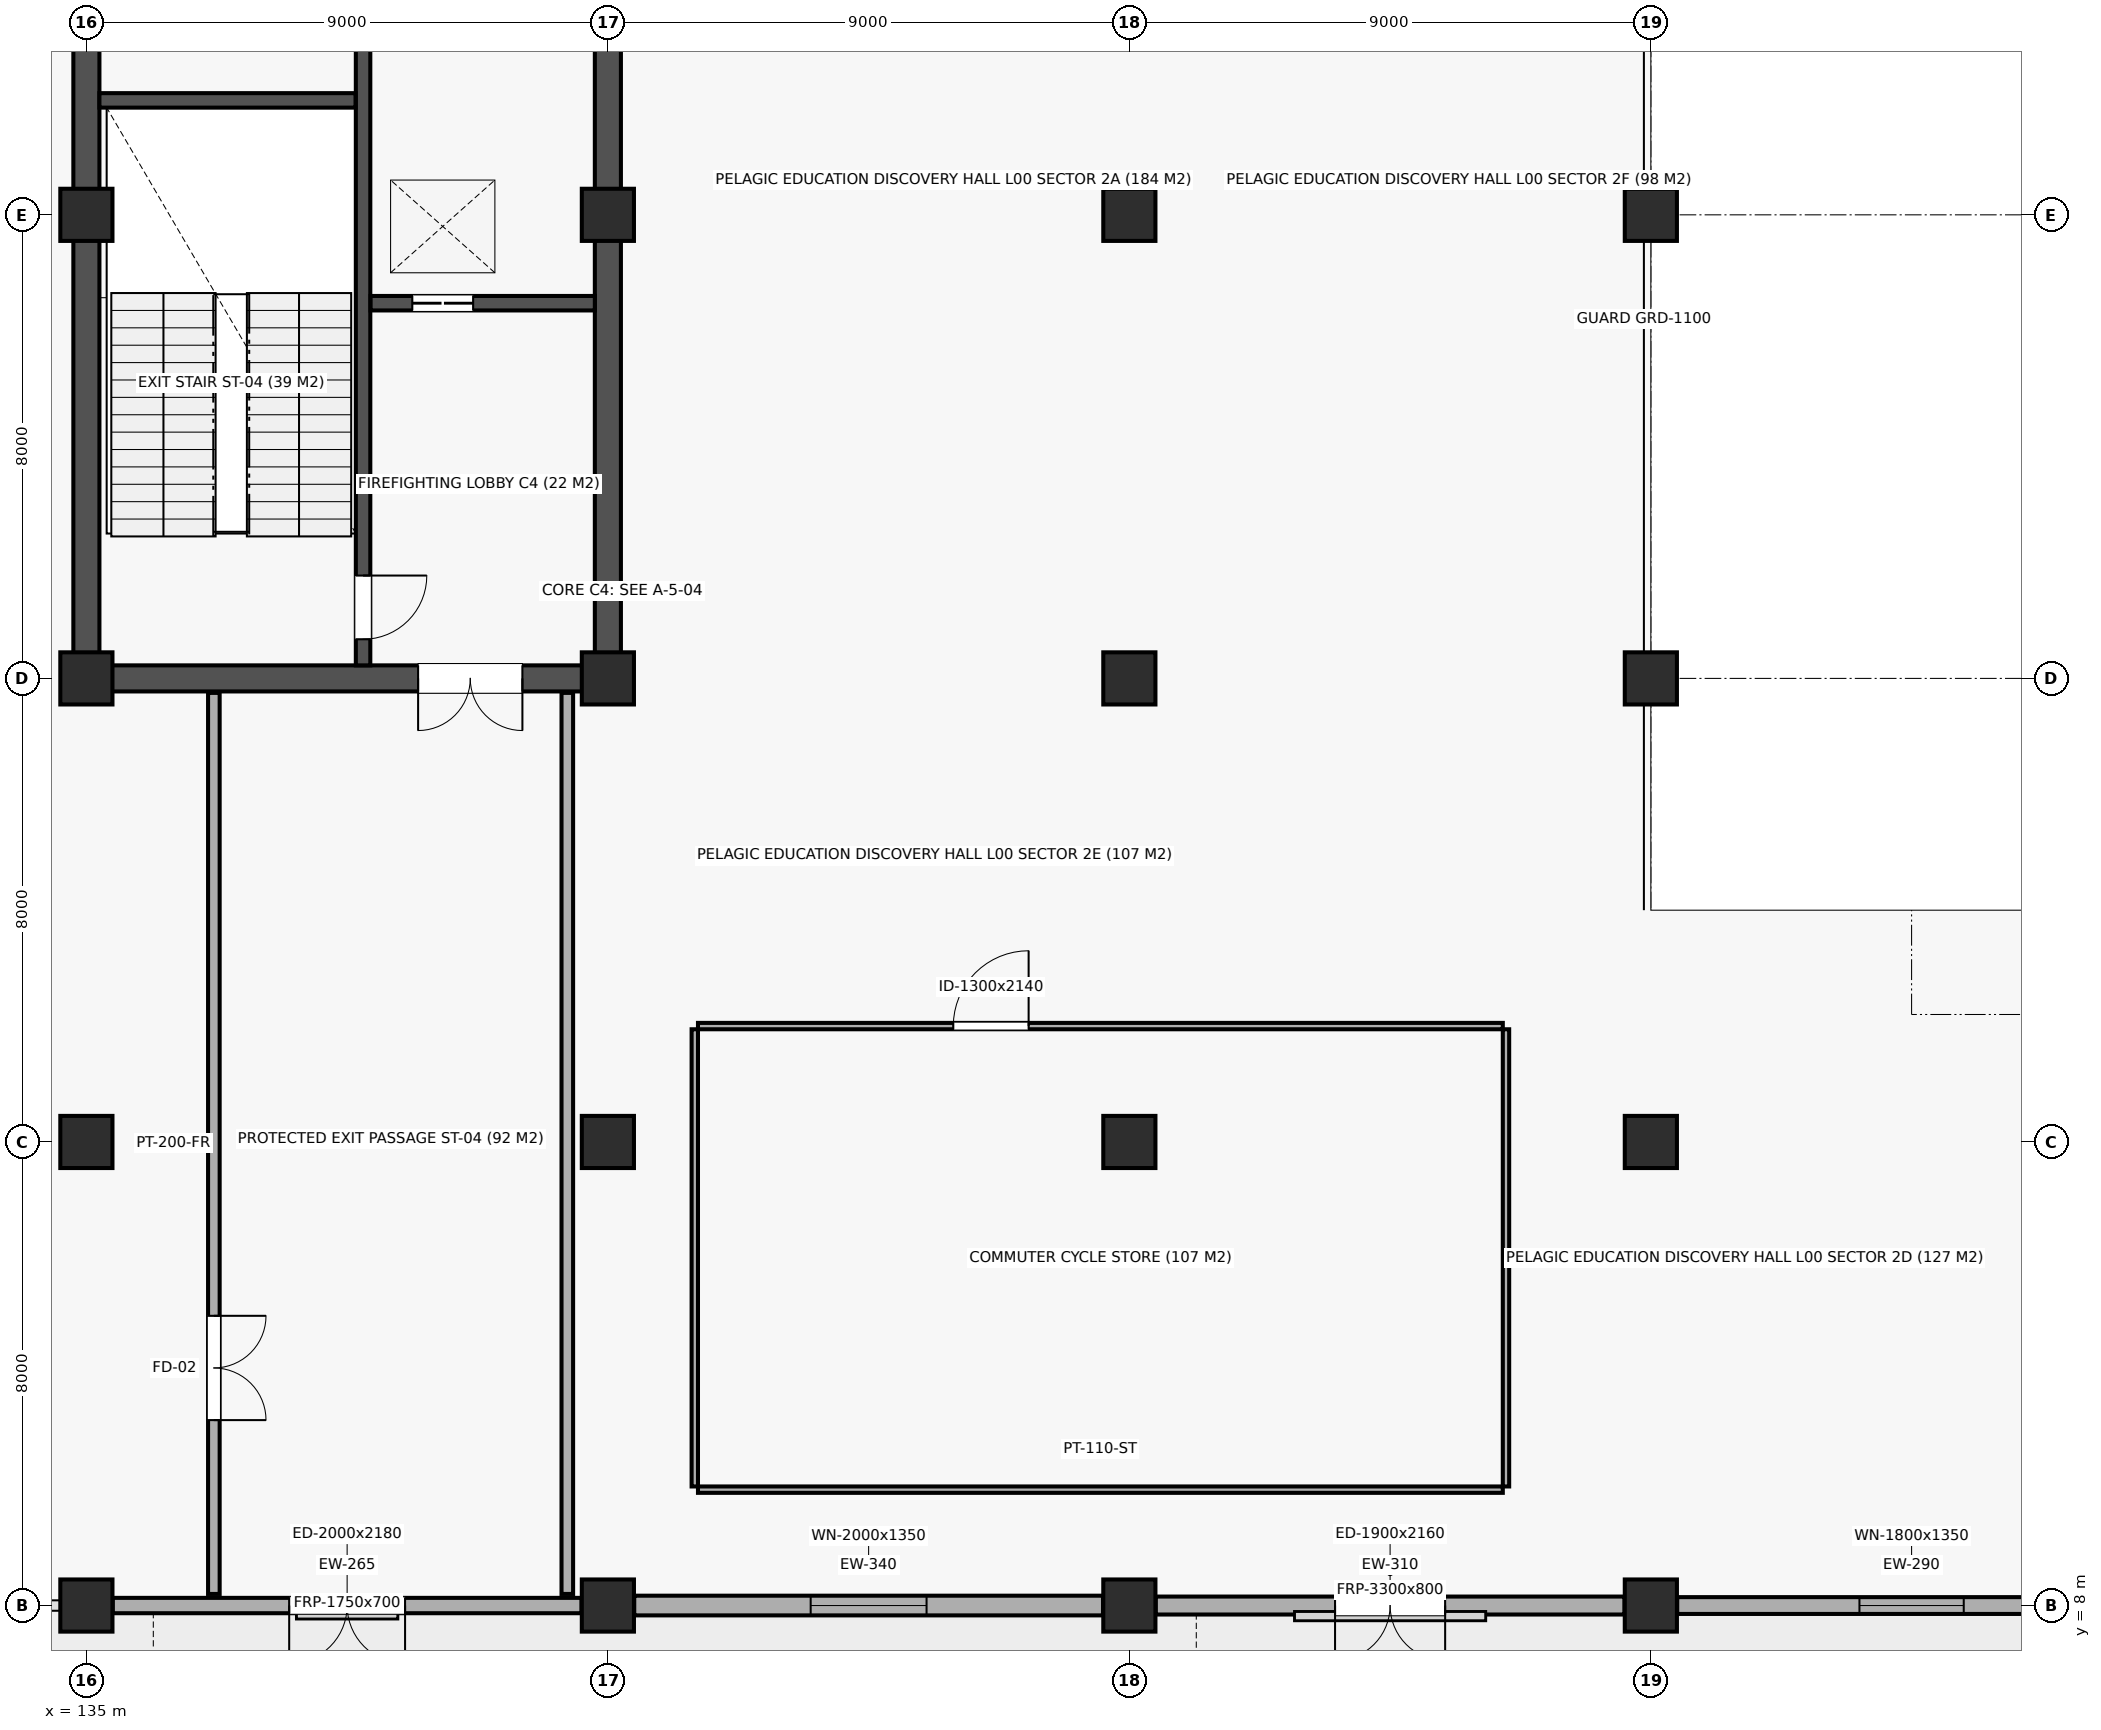
"""IFC4 building model, lengths in metres.
Left out: names, types, materials, properties, quantities, classifications, styles, units other than length and angle.
Written with IfcOpenShell. Run it as: python <this file> out.ifc"""

import sys

from ifc_helpers import new_model, si_unit, direction, frame, frame_2d, origin, origin_2d, place, context, subcontext, project, spatial, rectangle, extrude, element, fill, save


model = new_model("IFC4")
c1 = context("Model", 3, precision=1e-05, world=origin(), true_north=direction((0.0, 1.0)))
c2 = subcontext(c1, "Body", "Model", "MODEL_VIEW")
j1 = project(units=[si_unit("LENGTHUNIT", "METRE"), si_unit("PLANEANGLEUNIT", "RADIAN")], contexts=[c1])
p1 = place(None, origin())
s1 = spatial("IfcSite", under=j1, at=p1, CompositionType="ELEMENT")
p2 = place(p1, origin())
s2 = spatial("IfcBuilding", under=s1, at=p2, CompositionType="ELEMENT")
p3 = place(p2, origin())
s3 = spatial("IfcBuildingStorey", under=s2, at=p3, CompositionType="ELEMENT", Elevation=0.0)
for number, where, z_axis, x_axis in (
    (1, (135.0, 8.0, 0.0), (0.0, 0.0, 1.0), (1.0, 0.0, 0.0)),
    (2, (135.0, 16.0, 0.0), (0.0, 0.0, 1.0), (1.0, 0.0, 0.0)),
    (3, (135.0, 24.0, 0.0), (0.0, 0.0, 1.0), (1.0, 0.0, 0.0)),
    (4, (135.0, 32.0, 0.0), (0.0, 0.0, 1.0), (1.0, 0.0, 0.0)),
    (5, (144.0, 8.0, 0.0), (0.0, 0.0, 1.0), (1.0, 0.0, 0.0)),
    (6, (144.0, 16.0, 0.0), (0.0, 0.0, 1.0), (1.0, 0.0, 0.0)),
    (7, (144.0, 24.0, 0.0), (0.0, 0.0, 1.0), (1.0, 0.0, 0.0)),
    (8, (144.0, 32.0, 0.0), (0.0, 0.0, 1.0), (1.0, 0.0, 0.0)),
    (9, (153.0, 8.0, 0.0), (0.0, 0.0, 1.0), (1.0, 0.0, 0.0)),
    (10, (153.0, 16.0, 0.0), (0.0, 0.0, 1.0), (1.0, 0.0, 0.0)),
    (11, (153.0, 24.0, 0.0), (0.0, 0.0, 1.0), (1.0, 0.0, 0.0)),
    (12, (153.0, 32.0, 0.0), (0.0, 0.0, 1.0), (1.0, 0.0, 0.0)),
    (13, (162.0, 8.0, 0.0), (0.0, 0.0, 1.0), (1.0, 0.0, 0.0)),
    (14, (162.0, 16.0, 0.0), (0.0, 0.0, 1.0), (1.0, 0.0, 0.0)),
    (15, (162.0, 24.0, 0.0), (0.0, 0.0, 1.0), (1.0, 0.0, 0.0)),
    (16, (162.0, 32.0, 0.0), (0.0, 0.0, 1.0), (1.0, 0.0, 0.0)),
):
    element("IfcColumn", number, at=place(p3, frame(where, z_axis=z_axis, x_axis=x_axis)), inside=s3, PredefinedType="COLUMN", context=c2, shape_type="SweptSolid", body=[
        extrude(rectangle(XDim=0.9, YDim=0.9, at=origin_2d()), origin(), (0.0, 0.0, 1.0), 4.5),
    ])
p4 = place(p3, frame((135.225, 24.0, 0.0), z_axis=(0.0, 0.0, 1.0), x_axis=(1.0, 0.0, 0.0)))
e17 = element("IfcWall", 17, at=p4, inside=s3, PredefinedType="SHEAR", context=c2, shape_type="SweptSolid", body=[
    extrude(rectangle(XDim=8.55, YDim=0.45, at=frame_2d((4.275, 0.0))), origin(), (0.0, 0.0, 1.0), 3.45),
])
p5 = place(p4, frame((5.5, 0.0, 0.0)))
e18 = element("IfcOpeningElement", 18, at=p5, cuts=e17, PredefinedType="OPENING", context=c2, shape_type="SweptSolid", body=[
    extrude(rectangle(XDim=1.8, YDim=2.18, at=frame_2d((0.9, 1.09))), frame((0.0, 0.237, 0.0), z_axis=(0.0, -1.0, 0.0), x_axis=(1.0, 0.0, 0.0)), (0.0, 0.0, 1.0), 0.474),
])
p6 = place(p3, frame((135.0, 24.225, 0.0), z_axis=(0.0, 0.0, 1.0), x_axis=(0.0, 1.0, 0.0)))
e19 = element("IfcWall", 19, at=p6, inside=s3, PredefinedType="SHEAR", context=c2, shape_type="SweptSolid", body=[
    extrude(rectangle(XDim=15.55, YDim=0.45, at=frame_2d((7.775, 0.0))), origin(), (0.0, 0.0, 1.0), 3.45),
])
p7 = place(p6, frame((11.2, 0.0, 0.0)))
e20 = element("IfcOpeningElement", 20, at=p7, cuts=e19, PredefinedType="OPENING", context=c2, shape_type="SweptSolid", body=[
    extrude(rectangle(XDim=0.95, YDim=2.1, at=frame_2d((0.475, 1.05))), frame((0.0, 0.237, 0.0), z_axis=(0.0, -1.0, 0.0), x_axis=(1.0, 0.0, 0.0)), (0.0, 0.0, 1.0), 0.474),
])
p8 = place(p3, frame((144.0, 24.225, 0.0), z_axis=(0.0, 0.0, 1.0), x_axis=(0.0, 1.0, 0.0)))
e21 = element("IfcWall", 21, at=p8, inside=s3, PredefinedType="SHEAR", context=c2, shape_type="SweptSolid", body=[
    extrude(rectangle(XDim=15.55, YDim=0.45, at=frame_2d((7.775, 0.0))), origin(), (0.0, 0.0, 1.0), 3.45),
])
p9 = place(p3, frame((139.775, 24.225, 0.0), z_axis=(0.0, 0.0, 1.0), x_axis=(0.0, 1.0, 0.0)))
e22 = element("IfcWall", 22, at=p9, inside=s3, PredefinedType="SOLIDWALL", context=c2, shape_type="SweptSolid", body=[
    extrude(rectangle(XDim=15.55, YDim=0.25, at=frame_2d((7.775, 0.0))), origin(), (0.0, 0.0, 1.0), 3.45),
])
p10 = place(p9, frame((0.45, 0.0, 0.0)))
e23 = element("IfcOpeningElement", 23, at=p10, cuts=e22, PredefinedType="OPENING", context=c2, shape_type="SweptSolid", body=[
    extrude(rectangle(XDim=1.1, YDim=2.15, at=frame_2d((0.55, 1.075))), frame((0.0, 0.137, 0.0), z_axis=(0.0, -1.0, 0.0), x_axis=(1.0, 0.0, 0.0)), (0.0, 0.0, 1.0), 0.274),
])
p11 = place(p3, frame((135.225, 33.975, 0.0), z_axis=(0.0, 0.0, 1.0), x_axis=(1.0, 0.0, 0.0)))
e24 = element("IfcWall", 24, at=p11, inside=s3, PredefinedType="SOLIDWALL", context=c2, shape_type="SweptSolid", body=[
    extrude(rectangle(XDim=4.42, YDim=0.25, at=frame_2d((2.21, 0.0))), origin(), (0.0, 0.0, 1.0), 3.45),
])
p12 = place(p3, frame((139.905, 30.475, 0.0), z_axis=(0.0, 0.0, 1.0), x_axis=(1.0, 0.0, 0.0)))
e25 = element("IfcWall", 25, at=p12, inside=s3, PredefinedType="SOLIDWALL", context=c2, shape_type="SweptSolid", body=[
    extrude(rectangle(XDim=3.87, YDim=0.25, at=frame_2d((1.935, 0.0))), origin(), (0.0, 0.0, 1.0), 3.45),
])
p13 = place(p12, frame((0.72, 0.0, 0.0)))
e26 = element("IfcOpeningElement", 26, at=p13, cuts=e25, PredefinedType="OPENING", context=c2, shape_type="SweptSolid", body=[
    extrude(rectangle(XDim=1.05, YDim=2.12, at=frame_2d((0.525, 1.06))), frame((0.0, 0.137, 0.0), z_axis=(0.0, -1.0, 0.0), x_axis=(1.0, 0.0, 0.0)), (0.0, 0.0, 1.0), 0.274),
])
p14 = place(p3, frame((135.455, 8.0, 0.0), z_axis=(0.0, 0.0, 1.0), x_axis=(1.0, 0.0, 0.0)))
e27 = element("IfcWall", 27, at=p14, inside=s3, PredefinedType="STANDARD", context=c2, shape_type="SweptSolid", body=[
    extrude(rectangle(XDim=8.09, YDim=0.265, at=frame_2d((4.045, 0.0))), origin(), (0.0, 0.0, 1.0), 2.49),
])
p15 = place(p14, frame((3.045, 0.0, 0.0)))
e28 = element("IfcOpeningElement", 28, at=p15, cuts=e27, PredefinedType="OPENING", context=c2, shape_type="SweptSolid", body=[
    extrude(rectangle(XDim=2.0, YDim=2.18, at=frame_2d((1.0, 1.09))), frame((0.0, 0.145, 0.0), z_axis=(0.0, -1.0, 0.0), x_axis=(1.0, 0.0, 0.0)), (0.0, 0.0, 1.0), 0.289),
])
p16 = place(p3, frame((144.455, 8.0, 0.0), z_axis=(0.0, 0.0, 1.0), x_axis=(1.0, 0.0, 0.0)))
e29 = element("IfcWall", 29, at=p16, inside=s3, PredefinedType="STANDARD", context=c2, shape_type="SweptSolid", body=[
    extrude(rectangle(XDim=8.09, YDim=0.34, at=frame_2d((4.045, 0.0))), origin(), (0.0, 0.0, 1.0), 2.49),
])
p17 = place(p16, frame((3.045, 0.0, 0.85)))
e30 = element("IfcOpeningElement", 30, at=p17, cuts=e29, PredefinedType="OPENING", context=c2, shape_type="SweptSolid", body=[
    extrude(rectangle(XDim=2.0, YDim=1.35, at=frame_2d((1.0, 0.675))), frame((0.0, 0.182, 0.0), z_axis=(0.0, -1.0, 0.0), x_axis=(1.0, 0.0, 0.0)), (0.0, 0.0, 1.0), 0.364),
])
p18 = place(p3, frame((153.455, 8.0, 0.0), z_axis=(0.0, 0.0, 1.0), x_axis=(1.0, 0.0, 0.0)))
e31 = element("IfcWall", 31, at=p18, inside=s3, PredefinedType="STANDARD", context=c2, shape_type="SweptSolid", body=[
    extrude(rectangle(XDim=8.09, YDim=0.31, at=frame_2d((4.045, 0.0))), origin(), (0.0, 0.0, 1.0), 2.49),
])
p19 = place(p18, frame((3.095, 0.0, 0.0)))
e32 = element("IfcOpeningElement", 32, at=p19, cuts=e31, PredefinedType="OPENING", context=c2, shape_type="SweptSolid", body=[
    extrude(rectangle(XDim=1.9, YDim=2.16, at=frame_2d((0.95, 1.08))), frame((0.0, 0.167, 0.0), z_axis=(0.0, -1.0, 0.0), x_axis=(1.0, 0.0, 0.0)), (0.0, 0.0, 1.0), 0.334),
])
p20 = place(p3, frame((162.455, 8.0, 0.0), z_axis=(0.0, 0.0, 1.0), x_axis=(1.0, 0.0, 0.0)))
e33 = element("IfcWall", 33, at=p20, inside=s3, PredefinedType="STANDARD", context=c2, shape_type="SweptSolid", body=[
    extrude(rectangle(XDim=8.09, YDim=0.29, at=frame_2d((4.045, 0.0))), origin(), (0.0, 0.0, 1.0), 2.49),
])
p21 = place(p20, frame((3.145, 0.0, 0.85)))
e34 = element("IfcOpeningElement", 34, at=p21, cuts=e33, PredefinedType="OPENING", context=c2, shape_type="SweptSolid", body=[
    extrude(rectangle(XDim=1.8, YDim=1.35, at=frame_2d((0.9, 0.675))), frame((0.0, 0.157, 0.0), z_axis=(0.0, -1.0, 0.0), x_axis=(1.0, 0.0, 0.0)), (0.0, 0.0, 1.0), 0.314),
])
p22 = place(p3, frame((145.555, 10.0, 0.0), z_axis=(0.0, 0.0, 1.0), x_axis=(1.0, 0.0, 0.0)))
e35 = element("IfcWall", 35, at=p22, inside=s3, PredefinedType="PARTITIONING", context=c2, shape_type="SweptSolid", body=[
    extrude(rectangle(XDim=13.89, YDim=0.11, at=frame_2d((6.945, 0.0))), origin(), (0.0, 0.0, 1.0), 3.3),
])
p23 = place(p3, frame((145.555, 18.0, 0.0), z_axis=(0.0, 0.0, 1.0), x_axis=(1.0, 0.0, 0.0)))
e36 = element("IfcWall", 36, at=p23, inside=s3, PredefinedType="PARTITIONING", context=c2, shape_type="SweptSolid", body=[
    extrude(rectangle(XDim=13.89, YDim=0.11, at=frame_2d((6.945, 0.0))), origin(), (0.0, 0.0, 1.0), 3.3),
])
p24 = place(p23, frame((4.406, 0.0, 0.0)))
e37 = element("IfcOpeningElement", 37, at=p24, cuts=e36, PredefinedType="OPENING", context=c2, shape_type="SweptSolid", body=[
    extrude(rectangle(XDim=1.3, YDim=2.14, at=frame_2d((0.65, 1.07))), frame((0.0, 0.067, 0.0), z_axis=(0.0, -1.0, 0.0), x_axis=(1.0, 0.0, 0.0)), (0.0, 0.0, 1.0), 0.134),
])
for number, where, z_axis, x_axis in (
    (38, (145.5, 10.055, 0.0), (0.0, 0.0, 1.0), (0.0, 1.0, 0.0)),
    (39, (159.5, 10.055, 0.0), (0.0, 0.0, 1.0), (0.0, 1.0, 0.0)),
):
    element("IfcWall", number, at=place(p3, frame(where, z_axis=z_axis, x_axis=x_axis)), inside=s3, PredefinedType="PARTITIONING", context=c2, shape_type="SweptSolid", body=[
        extrude(rectangle(XDim=7.89, YDim=0.11, at=frame_2d((3.945, 0.0))), origin(), (0.0, 0.0, 1.0), 3.3),
    ])
p25 = place(p3, frame((137.2, 8.2, 0.0), z_axis=(0.0, 0.0, 1.0), x_axis=(0.0, 1.0, 0.0)))
e40 = element("IfcWall", 40, at=p25, inside=s3, PredefinedType="PARTITIONING", context=c2, shape_type="SweptSolid", body=[
    extrude(rectangle(XDim=15.55, YDim=0.2, at=frame_2d((7.775, 0.0))), origin(), (0.0, 0.0, 1.0), 3.3),
])
p26 = place(p25, frame((3.0, 0.0, 0.0)))
e41 = element("IfcOpeningElement", 41, at=p26, cuts=e40, PredefinedType="OPENING", context=c2, shape_type="SweptSolid", body=[
    extrude(rectangle(XDim=1.8, YDim=2.18, at=frame_2d((0.9, 1.09))), frame((0.0, 0.112, 0.0), z_axis=(0.0, -1.0, 0.0), x_axis=(1.0, 0.0, 0.0)), (0.0, 0.0, 1.0), 0.224),
])
p27 = place(p3, frame((143.3, 8.2, 0.0), z_axis=(0.0, 0.0, 1.0), x_axis=(0.0, 1.0, 0.0)))
e42 = element("IfcWall", 42, at=p27, inside=s3, PredefinedType="PARTITIONING", context=c2, shape_type="SweptSolid", body=[
    extrude(rectangle(XDim=15.55, YDim=0.2, at=frame_2d((7.775, 0.0))), origin(), (0.0, 0.0, 1.0), 3.3),
])
p28 = place(p5, frame((1.8, 0.0, 0.0), z_axis=(0.0, 0.0, 1.0), x_axis=(-1.0, 0.0, 0.0)))
e43 = element("IfcDoor", 43, at=p28, inside=s3, OperationType="DOUBLE_DOOR_SINGLE_SWING", PredefinedType="DOOR", context=c2, shape_type="SweptSolid", body=[
    extrude(rectangle(XDim=1.8, YDim=2.18, at=frame_2d((0.9, 1.09))), frame((0.0, 0.025, 0.0), z_axis=(0.0, -1.0, 0.0), x_axis=(1.0, 0.0, 0.0)), (0.0, 0.0, 1.0), 0.05),
])
fill(e18, e43)
p29 = place(p10, frame((1.1, 0.0, 0.0), z_axis=(0.0, 0.0, 1.0), x_axis=(-1.0, 0.0, 0.0)))
e44 = element("IfcDoor", 44, at=p29, inside=s3, OperationType="SINGLE_SWING_LEFT", PredefinedType="DOOR", context=c2, shape_type="SweptSolid", body=[
    extrude(rectangle(XDim=1.1, YDim=2.15, at=frame_2d((0.55, 1.075))), frame((0.0, 0.025, 0.0), z_axis=(0.0, -1.0, 0.0), x_axis=(1.0, 0.0, 0.0)), (0.0, 0.0, 1.0), 0.05),
])
fill(e23, e44)
p30 = place(p13, origin())
e45 = element("IfcDoor", 45, at=p30, inside=s3, OperationType="DOUBLE_DOOR_SLIDING", PredefinedType="DOOR", context=c2, shape_type="SweptSolid", body=[
    extrude(rectangle(XDim=1.05, YDim=2.12, at=frame_2d((0.525, 1.06))), frame((0.0, 0.025, 0.0), z_axis=(0.0, -1.0, 0.0), x_axis=(1.0, 0.0, 0.0)), (0.0, 0.0, 1.0), 0.05),
])
fill(e26, e45)
p31 = place(p15, frame((2.0, 0.0, 0.0), z_axis=(0.0, 0.0, 1.0), x_axis=(-1.0, 0.0, 0.0)))
e46 = element("IfcDoor", 46, at=p31, inside=s3, OperationType="DOUBLE_DOOR_SINGLE_SWING", PredefinedType="DOOR", context=c2, shape_type="SweptSolid", body=[
    extrude(rectangle(XDim=2.0, YDim=2.18, at=frame_2d((1.0, 1.09))), frame((0.0, 0.025, 0.0), z_axis=(0.0, -1.0, 0.0), x_axis=(1.0, 0.0, 0.0)), (0.0, 0.0, 1.0), 0.05),
])
fill(e28, e46)
p32 = place(p17, origin())
e47 = element("IfcWindow", 47, at=p32, inside=s3, PartitioningType="SINGLE_PANEL", PredefinedType="WINDOW", context=c2, shape_type="SweptSolid", body=[
    extrude(rectangle(XDim=2.0, YDim=1.35, at=frame_2d((1.0, 0.675))), frame((0.0, 0.03, 0.0), z_axis=(0.0, -1.0, 0.0), x_axis=(1.0, 0.0, 0.0)), (0.0, 0.0, 1.0), 0.06),
])
fill(e30, e47)
p33 = place(p19, frame((1.9, 0.0, 0.0), z_axis=(0.0, 0.0, 1.0), x_axis=(-1.0, 0.0, 0.0)))
e48 = element("IfcDoor", 48, at=p33, inside=s3, OperationType="DOUBLE_DOOR_SINGLE_SWING", PredefinedType="DOOR", context=c2, shape_type="SweptSolid", body=[
    extrude(rectangle(XDim=1.9, YDim=2.16, at=frame_2d((0.95, 1.08))), frame((0.0, 0.025, 0.0), z_axis=(0.0, -1.0, 0.0), x_axis=(1.0, 0.0, 0.0)), (0.0, 0.0, 1.0), 0.05),
])
fill(e32, e48)
p34 = place(p21, origin())
e49 = element("IfcWindow", 49, at=p34, inside=s3, PartitioningType="SINGLE_PANEL", PredefinedType="WINDOW", context=c2, shape_type="SweptSolid", body=[
    extrude(rectangle(XDim=1.8, YDim=1.35, at=frame_2d((0.9, 0.675))), frame((0.0, 0.03, 0.0), z_axis=(0.0, -1.0, 0.0), x_axis=(1.0, 0.0, 0.0)), (0.0, 0.0, 1.0), 0.06),
])
fill(e34, e49)
p35 = place(p24, origin())
e50 = element("IfcDoor", 50, at=p35, inside=s3, OperationType="SINGLE_SWING_RIGHT", PredefinedType="DOOR", context=c2, shape_type="SweptSolid", body=[
    extrude(rectangle(XDim=1.3, YDim=2.14, at=frame_2d((0.65, 1.07))), frame((0.0, 0.025, 0.0), z_axis=(0.0, -1.0, 0.0), x_axis=(1.0, 0.0, 0.0)), (0.0, 0.0, 1.0), 0.05),
])
fill(e37, e50)
p36 = place(p26, frame((1.8, 0.0, 0.0), z_axis=(0.0, 0.0, 1.0), x_axis=(-1.0, 0.0, 0.0)))
e51 = element("IfcDoor", 51, at=p36, inside=s3, OperationType="DOUBLE_DOOR_SINGLE_SWING", PredefinedType="DOOR", context=c2, shape_type="SweptSolid", body=[
    extrude(rectangle(XDim=1.8, YDim=2.18, at=frame_2d((0.9, 1.09))), frame((0.0, 0.025, 0.0), z_axis=(0.0, -1.0, 0.0), x_axis=(1.0, 0.0, 0.0)), (0.0, 0.0, 1.0), 0.05),
])
fill(e41, e51)
save(model, sys.argv[1])
